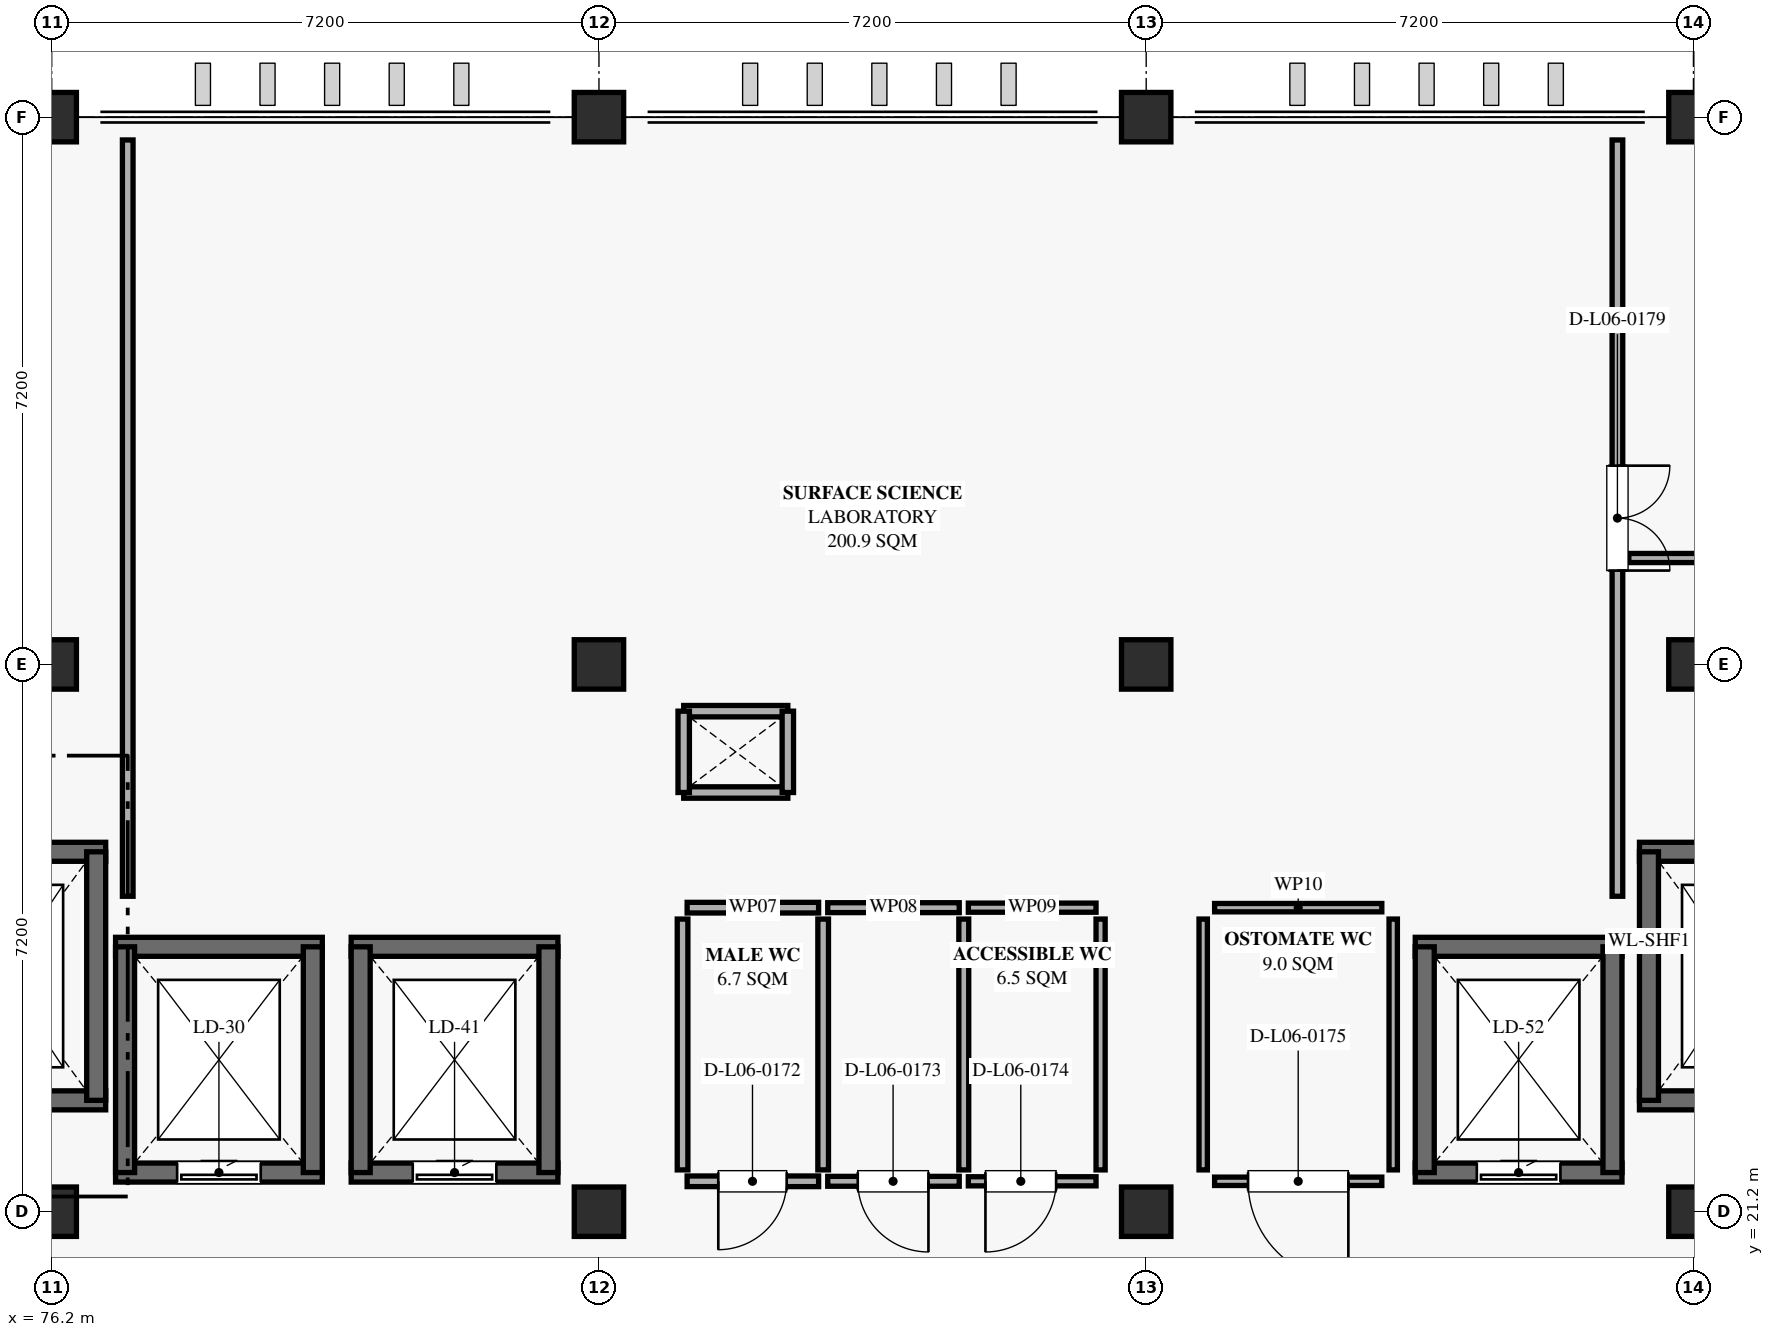
"""IFC4 building model, lengths in metres.
Left out: names, types, materials, properties, quantities, classifications, styles, units other than length and angle.
Written with IfcOpenShell. Run it as: python <this file> out.ifc"""

import sys

from ifc_helpers import new_model, si_unit, direction, frame, frame_2d, origin, origin_2d, place, context, subcontext, project, spatial, rectangle, extrude, element, fill, save


model = new_model("IFC4")
c1 = context("Model", 3, precision=1e-05, world=origin(), true_north=direction((0.0, 1.0)))
c2 = subcontext(c1, "Body", "Model", "MODEL_VIEW")
j1 = project(units=[si_unit("LENGTHUNIT", "METRE"), si_unit("PLANEANGLEUNIT", "RADIAN")], contexts=[c1])
p1 = place(None, origin())
s1 = spatial("IfcSite", under=j1, at=p1, CompositionType="ELEMENT")
p2 = place(p1, origin())
s2 = spatial("IfcBuilding", under=s1, at=p2, CompositionType="ELEMENT")
p3 = place(p2, frame((0.0, 0.0, 28.8)))
s3 = spatial("IfcBuildingStorey", under=s2, at=p3, CompositionType="ELEMENT", Elevation=28.8)
for number, where, z_axis, x_axis in (
    (1, (76.2, 21.2, 0.0), (0.0, 0.0, 1.0), (1.0, 0.0, 0.0)),
    (2, (83.4, 21.2, 0.0), (0.0, 0.0, 1.0), (1.0, 0.0, 0.0)),
    (3, (90.6, 21.2, 0.0), (0.0, 0.0, 1.0), (1.0, 0.0, 0.0)),
    (4, (97.8, 21.2, 0.0), (0.0, 0.0, 1.0), (1.0, 0.0, 0.0)),
    (5, (76.2, 28.4, 0.0), (0.0, 0.0, 1.0), (1.0, 0.0, 0.0)),
    (6, (83.4, 28.4, 0.0), (0.0, 0.0, 1.0), (1.0, 0.0, 0.0)),
    (7, (90.6, 28.4, 0.0), (0.0, 0.0, 1.0), (1.0, 0.0, 0.0)),
    (8, (97.8, 28.4, 0.0), (0.0, 0.0, 1.0), (1.0, 0.0, 0.0)),
    (9, (76.2, 35.6, 0.0), (0.0, 0.0, 1.0), (1.0, 0.0, 0.0)),
    (10, (83.4, 35.6, 0.0), (0.0, 0.0, 1.0), (1.0, 0.0, 0.0)),
    (11, (90.6, 35.6, 0.0), (0.0, 0.0, 1.0), (1.0, 0.0, 0.0)),
    (12, (97.8, 35.6, 0.0), (0.0, 0.0, 1.0), (1.0, 0.0, 0.0)),
):
    element("IfcColumn", number, at=place(p3, frame(where, z_axis=z_axis, x_axis=x_axis)), inside=s3, PredefinedType="COLUMN", context=c2, shape_type="SweptSolid", body=[
        extrude(rectangle(XDim=0.65, YDim=0.65, at=origin_2d()), origin(), (0.0, 0.0, 1.0), 4.5),
    ])
for number, where, z_axis, x_axis in (
    (13, (85.885, 26.715, 0.0), (0.0, 0.0, 1.0), (-1.0, 0.0, 0.0)),
    (14, (84.515, 27.785, 0.0), (0.0, 0.0, 1.0), (1.0, 0.0, 0.0)),
):
    element("IfcWall", number, at=place(p3, frame(where, z_axis=z_axis, x_axis=x_axis)), inside=s3, PredefinedType="PARTITIONING", context=c2, shape_type="SweptSolid", body=[
        extrude(rectangle(XDim=1.37, YDim=0.15, at=frame_2d((0.685, 0.0))), origin(), (0.0, 0.0, 1.0), 2.98),
    ])
for number, where, z_axis, x_axis in (
    (15, (84.515, 26.715, 0.0), (0.0, 0.0, 1.0), (0.0, 1.0, 0.0)),
    (16, (85.885, 27.785, 0.0), (0.0, 0.0, 1.0), (0.0, -1.0, 0.0)),
):
    element("IfcWall", number, at=place(p3, frame(where, z_axis=z_axis, x_axis=x_axis)), inside=s3, PredefinedType="PARTITIONING", context=c2, shape_type="SweptSolid", body=[
        extrude(rectangle(XDim=1.07, YDim=0.15, at=frame_2d((0.535, 0.0))), origin(), (0.0, 0.0, 1.0), 2.98),
    ])
for number, where, z_axis, x_axis in (
    (17, (76.91, 22.665, 0.0), (0.0, 0.0, 1.0), (-1.0, 0.0, 0.0)),
    (18, (74.19, 25.935, 0.0), (0.0, 0.0, 1.0), (1.0, 0.0, 0.0)),
):
    element("IfcWall", number, at=place(p3, frame(where, z_axis=z_axis, x_axis=x_axis)), inside=s3, PredefinedType="SHEAR", context=c2, shape_type="SweptSolid", body=[
        extrude(rectangle(XDim=2.72, YDim=0.25, at=frame_2d((1.36, 0.0))), origin(), (0.0, 0.0, 1.0), 4.23),
    ])
p4 = place(p3, frame((76.785, 25.935, 0.0), z_axis=(0.0, 0.0, 1.0), x_axis=(0.0, -1.0, 0.0)))
e19 = element("IfcWall", 19, at=p4, inside=s3, PredefinedType="SHEAR", context=c2, shape_type="SweptSolid", body=[
    extrude(rectangle(XDim=3.27, YDim=0.25, at=frame_2d((1.635, 0.0))), origin(), (0.0, 0.0, 1.0), 4.23),
])
for number, where, z_axis, x_axis in (
    (20, (99.81, 22.665, 0.0), (0.0, 0.0, 1.0), (-1.0, 0.0, 0.0)),
    (21, (97.09, 25.935, 0.0), (0.0, 0.0, 1.0), (1.0, 0.0, 0.0)),
):
    element("IfcWall", number, at=place(p3, frame(where, z_axis=z_axis, x_axis=x_axis)), inside=s3, PredefinedType="SHEAR", context=c2, shape_type="SweptSolid", body=[
        extrude(rectangle(XDim=2.72, YDim=0.25, at=frame_2d((1.36, 0.0))), origin(), (0.0, 0.0, 1.0), 4.23),
    ])
p5 = place(p3, frame((97.215, 22.665, 0.0), z_axis=(0.0, 0.0, 1.0), x_axis=(0.0, 1.0, 0.0)))
e22 = element("IfcWall", 22, at=p5, inside=s3, PredefinedType="SHEAR", context=c2, shape_type="SweptSolid", body=[
    extrude(rectangle(XDim=3.27, YDim=0.25, at=frame_2d((1.635, 0.0))), origin(), (0.0, 0.0, 1.0), 4.23),
])
p6 = place(p3, frame((79.76, 21.715, 0.0), z_axis=(0.0, 0.0, 1.0), x_axis=(-1.0, 0.0, 0.0)))
e23 = element("IfcWall", 23, at=p6, inside=s3, PredefinedType="SHEAR", context=c2, shape_type="SweptSolid", body=[
    extrude(rectangle(XDim=2.72, YDim=0.25, at=frame_2d((1.36, 0.0))), origin(), (0.0, 0.0, 1.0), 4.23),
])
p7 = place(p6, frame((0.81, 0.0, 0.0)))
e24 = element("IfcOpeningElement", 24, at=p7, cuts=e23, PredefinedType="OPENING", context=c2, shape_type="SweptSolid", body=[
    extrude(rectangle(XDim=1.1, YDim=2.2, at=frame_2d((0.55, 1.1))), frame((0.0, 0.135, 0.0), z_axis=(0.0, -1.0, 0.0), x_axis=(1.0, 0.0, 0.0)), (0.0, 0.0, 1.0), 0.27),
])
p8 = place(p3, frame((77.04, 24.685, 0.0), z_axis=(0.0, 0.0, 1.0), x_axis=(1.0, 0.0, 0.0)))
e25 = element("IfcWall", 25, at=p8, inside=s3, PredefinedType="SHEAR", context=c2, shape_type="SweptSolid", body=[
    extrude(rectangle(XDim=2.72, YDim=0.25, at=frame_2d((1.36, 0.0))), origin(), (0.0, 0.0, 1.0), 4.23),
])
for number, where, z_axis, x_axis in (
    (26, (77.165, 21.715, 0.0), (0.0, 0.0, 1.0), (0.0, 1.0, 0.0)),
    (27, (79.635, 24.685, 0.0), (0.0, 0.0, 1.0), (0.0, -1.0, 0.0)),
):
    element("IfcWall", number, at=place(p3, frame(where, z_axis=z_axis, x_axis=x_axis)), inside=s3, PredefinedType="SHEAR", context=c2, shape_type="SweptSolid", body=[
        extrude(rectangle(XDim=2.97, YDim=0.25, at=frame_2d((1.485, 0.0))), origin(), (0.0, 0.0, 1.0), 4.23),
    ])
p9 = place(p3, frame((82.86, 21.715, 0.0), z_axis=(0.0, 0.0, 1.0), x_axis=(-1.0, 0.0, 0.0)))
e28 = element("IfcWall", 28, at=p9, inside=s3, PredefinedType="SHEAR", context=c2, shape_type="SweptSolid", body=[
    extrude(rectangle(XDim=2.72, YDim=0.25, at=frame_2d((1.36, 0.0))), origin(), (0.0, 0.0, 1.0), 4.23),
])
p10 = place(p9, frame((0.81, 0.0, 0.0)))
e29 = element("IfcOpeningElement", 29, at=p10, cuts=e28, PredefinedType="OPENING", context=c2, shape_type="SweptSolid", body=[
    extrude(rectangle(XDim=1.1, YDim=2.2, at=frame_2d((0.55, 1.1))), frame((0.0, 0.135, 0.0), z_axis=(0.0, -1.0, 0.0), x_axis=(1.0, 0.0, 0.0)), (0.0, 0.0, 1.0), 0.27),
])
p11 = place(p3, frame((80.14, 24.685, 0.0), z_axis=(0.0, 0.0, 1.0), x_axis=(1.0, 0.0, 0.0)))
e30 = element("IfcWall", 30, at=p11, inside=s3, PredefinedType="SHEAR", context=c2, shape_type="SweptSolid", body=[
    extrude(rectangle(XDim=2.72, YDim=0.25, at=frame_2d((1.36, 0.0))), origin(), (0.0, 0.0, 1.0), 4.23),
])
for number, where, z_axis, x_axis in (
    (31, (80.265, 21.715, 0.0), (0.0, 0.0, 1.0), (0.0, 1.0, 0.0)),
    (32, (82.735, 24.685, 0.0), (0.0, 0.0, 1.0), (0.0, -1.0, 0.0)),
):
    element("IfcWall", number, at=place(p3, frame(where, z_axis=z_axis, x_axis=x_axis)), inside=s3, PredefinedType="SHEAR", context=c2, shape_type="SweptSolid", body=[
        extrude(rectangle(XDim=2.97, YDim=0.25, at=frame_2d((1.485, 0.0))), origin(), (0.0, 0.0, 1.0), 4.23),
    ])
p12 = place(p3, frame((96.86, 21.715, 0.0), z_axis=(0.0, 0.0, 1.0), x_axis=(-1.0, 0.0, 0.0)))
e33 = element("IfcWall", 33, at=p12, inside=s3, PredefinedType="SHEAR", context=c2, shape_type="SweptSolid", body=[
    extrude(rectangle(XDim=2.72, YDim=0.25, at=frame_2d((1.36, 0.0))), origin(), (0.0, 0.0, 1.0), 4.23),
])
p13 = place(p12, frame((0.81, 0.0, 0.0)))
e34 = element("IfcOpeningElement", 34, at=p13, cuts=e33, PredefinedType="OPENING", context=c2, shape_type="SweptSolid", body=[
    extrude(rectangle(XDim=1.1, YDim=2.2, at=frame_2d((0.55, 1.1))), frame((0.0, 0.135, 0.0), z_axis=(0.0, -1.0, 0.0), x_axis=(1.0, 0.0, 0.0)), (0.0, 0.0, 1.0), 0.27),
])
p14 = place(p3, frame((94.14, 24.685, 0.0), z_axis=(0.0, 0.0, 1.0), x_axis=(1.0, 0.0, 0.0)))
e35 = element("IfcWall", 35, at=p14, inside=s3, PredefinedType="SHEAR", context=c2, shape_type="SweptSolid", body=[
    extrude(rectangle(XDim=2.72, YDim=0.25, at=frame_2d((1.36, 0.0))), origin(), (0.0, 0.0, 1.0), 4.23),
])
for number, where, z_axis, x_axis in (
    (36, (94.265, 21.715, 0.0), (0.0, 0.0, 1.0), (0.0, 1.0, 0.0)),
    (37, (96.735, 24.685, 0.0), (0.0, 0.0, 1.0), (0.0, -1.0, 0.0)),
):
    element("IfcWall", number, at=place(p3, frame(where, z_axis=z_axis, x_axis=x_axis)), inside=s3, PredefinedType="SHEAR", context=c2, shape_type="SweptSolid", body=[
        extrude(rectangle(XDim=2.97, YDim=0.25, at=frame_2d((1.485, 0.0))), origin(), (0.0, 0.0, 1.0), 4.23),
    ])
p15 = place(p3, frame((86.29, 21.6, 0.0), z_axis=(0.0, 0.0, 1.0), x_axis=(-1.0, 0.0, 0.0)))
e38 = element("IfcWall", 38, at=p15, inside=s3, PredefinedType="PARTITIONING", context=c2, shape_type="SweptSolid", body=[
    extrude(rectangle(XDim=1.73, YDim=0.14, at=frame_2d((0.865, 0.0))), origin(), (0.0, 0.0, 1.0), 2.98),
])
p16 = place(p15, frame((0.42, 0.0, 0.0)))
e39 = element("IfcOpeningElement", 39, at=p16, cuts=e38, PredefinedType="OPENING", context=c2, shape_type="SweptSolid", body=[
    extrude(rectangle(XDim=0.9, YDim=2.22, at=frame_2d((0.45, 1.11))), frame((0.0, 0.08, 0.0), z_axis=(0.0, -1.0, 0.0), x_axis=(1.0, 0.0, 0.0)), (0.0, 0.0, 1.0), 0.16),
])
p17 = place(p3, frame((84.56, 25.2, 0.0), z_axis=(0.0, 0.0, 1.0), x_axis=(1.0, 0.0, 0.0)))
e40 = element("IfcWall", 40, at=p17, inside=s3, PredefinedType="PARTITIONING", context=c2, shape_type="SweptSolid", body=[
    extrude(rectangle(XDim=1.73, YDim=0.14, at=frame_2d((0.865, 0.0))), origin(), (0.0, 0.0, 1.0), 2.98),
])
for number, where, z_axis, x_axis in (
    (41, (84.5, 21.75, 0.0), (0.0, 0.0, 1.0), (0.0, 1.0, 0.0)),
    (42, (86.35, 25.05, 0.0), (0.0, 0.0, 1.0), (0.0, -1.0, 0.0)),
):
    element("IfcWall", number, at=place(p3, frame(where, z_axis=z_axis, x_axis=x_axis)), inside=s3, PredefinedType="PARTITIONING", context=c2, shape_type="SweptSolid", body=[
        extrude(rectangle(XDim=3.3, YDim=0.14, at=frame_2d((1.65, 0.0))), origin(), (0.0, 0.0, 1.0), 2.98),
    ])
p18 = place(p3, frame((88.14, 21.6, 0.0), z_axis=(0.0, 0.0, 1.0), x_axis=(-1.0, 0.0, 0.0)))
e43 = element("IfcWall", 43, at=p18, inside=s3, PredefinedType="PARTITIONING", context=c2, shape_type="SweptSolid", body=[
    extrude(rectangle(XDim=1.73, YDim=0.13, at=frame_2d((0.865, 0.0))), origin(), (0.0, 0.0, 1.0), 2.98),
])
p19 = place(p18, frame((0.405, 0.0, 0.0)))
e44 = element("IfcOpeningElement", 44, at=p19, cuts=e43, PredefinedType="OPENING", context=c2, shape_type="SweptSolid", body=[
    extrude(rectangle(XDim=0.93, YDim=2.05, at=frame_2d((0.465, 1.025))), frame((0.0, 0.075, 0.0), z_axis=(0.0, -1.0, 0.0), x_axis=(1.0, 0.0, 0.0)), (0.0, 0.0, 1.0), 0.15),
])
p20 = place(p3, frame((86.41, 25.2, 0.0), z_axis=(0.0, 0.0, 1.0), x_axis=(1.0, 0.0, 0.0)))
e45 = element("IfcWall", 45, at=p20, inside=s3, PredefinedType="PARTITIONING", context=c2, shape_type="SweptSolid", body=[
    extrude(rectangle(XDim=1.73, YDim=0.13, at=frame_2d((0.865, 0.0))), origin(), (0.0, 0.0, 1.0), 2.98),
])
p21 = place(p3, frame((88.2, 25.05, 0.0), z_axis=(0.0, 0.0, 1.0), x_axis=(0.0, -1.0, 0.0)))
e46 = element("IfcWall", 46, at=p21, inside=s3, PredefinedType="PARTITIONING", context=c2, shape_type="SweptSolid", body=[
    extrude(rectangle(XDim=3.3, YDim=0.13, at=frame_2d((1.65, 0.0))), origin(), (0.0, 0.0, 1.0), 2.98),
])
p22 = place(p3, frame((89.94, 21.6, 0.0), z_axis=(0.0, 0.0, 1.0), x_axis=(-1.0, 0.0, 0.0)))
e47 = element("IfcWall", 47, at=p22, inside=s3, PredefinedType="PARTITIONING", context=c2, shape_type="SweptSolid", body=[
    extrude(rectangle(XDim=1.68, YDim=0.12, at=frame_2d((0.84, 0.0))), origin(), (0.0, 0.0, 1.0), 2.98),
])
p23 = place(p22, frame((0.525, 0.0, 0.0)))
e48 = element("IfcOpeningElement", 48, at=p23, cuts=e47, PredefinedType="OPENING", context=c2, shape_type="SweptSolid", body=[
    extrude(rectangle(XDim=0.93, YDim=2.1, at=frame_2d((0.465, 1.05))), frame((0.0, 0.07, 0.0), z_axis=(0.0, -1.0, 0.0), x_axis=(1.0, 0.0, 0.0)), (0.0, 0.0, 1.0), 0.14),
])
p24 = place(p3, frame((88.26, 25.2, 0.0), z_axis=(0.0, 0.0, 1.0), x_axis=(1.0, 0.0, 0.0)))
e49 = element("IfcWall", 49, at=p24, inside=s3, PredefinedType="PARTITIONING", context=c2, shape_type="SweptSolid", body=[
    extrude(rectangle(XDim=1.68, YDim=0.12, at=frame_2d((0.84, 0.0))), origin(), (0.0, 0.0, 1.0), 2.98),
])
p25 = place(p3, frame((90.0, 25.05, 0.0), z_axis=(0.0, 0.0, 1.0), x_axis=(0.0, -1.0, 0.0)))
e50 = element("IfcWall", 50, at=p25, inside=s3, PredefinedType="PARTITIONING", context=c2, shape_type="SweptSolid", body=[
    extrude(rectangle(XDim=3.3, YDim=0.12, at=frame_2d((1.65, 0.0))), origin(), (0.0, 0.0, 1.0), 2.98),
])
p26 = place(p3, frame((93.7, 21.6, 0.0), z_axis=(0.0, 0.0, 1.0), x_axis=(-1.0, 0.0, 0.0)))
e51 = element("IfcWall", 51, at=p26, inside=s3, PredefinedType="PARTITIONING", context=c2, shape_type="SweptSolid", body=[
    extrude(rectangle(XDim=2.2, YDim=0.11, at=frame_2d((1.1, 0.0))), origin(), (0.0, 0.0, 1.0), 2.98),
])
p27 = place(p26, frame((0.44, 0.0, 0.0)))
e52 = element("IfcOpeningElement", 52, at=p27, cuts=e51, PredefinedType="OPENING", context=c2, shape_type="SweptSolid", body=[
    extrude(rectangle(XDim=1.32, YDim=2.16, at=frame_2d((0.66, 1.08))), frame((0.0, 0.065, 0.0), z_axis=(0.0, -1.0, 0.0), x_axis=(1.0, 0.0, 0.0)), (0.0, 0.0, 1.0), 0.13),
])
p28 = place(p3, frame((91.5, 25.2, 0.0), z_axis=(0.0, 0.0, 1.0), x_axis=(1.0, 0.0, 0.0)))
e53 = element("IfcWall", 53, at=p28, inside=s3, PredefinedType="PARTITIONING", context=c2, shape_type="SweptSolid", body=[
    extrude(rectangle(XDim=2.2, YDim=0.11, at=frame_2d((1.1, 0.0))), origin(), (0.0, 0.0, 1.0), 2.98),
])
for number, where, z_axis, x_axis in (
    (54, (91.35, 21.75, 0.0), (0.0, 0.0, 1.0), (0.0, 1.0, 0.0)),
    (55, (93.85, 25.05, 0.0), (0.0, 0.0, 1.0), (0.0, -1.0, 0.0)),
):
    element("IfcWall", number, at=place(p3, frame(where, z_axis=z_axis, x_axis=x_axis)), inside=s3, PredefinedType="PARTITIONING", context=c2, shape_type="SweptSolid", body=[
        extrude(rectangle(XDim=3.3, YDim=0.11, at=frame_2d((1.65, 0.0))), origin(), (0.0, 0.0, 1.0), 2.98),
    ])
p29 = place(p3, frame((77.2, 25.35, 0.0), z_axis=(0.0, 0.0, 1.0), x_axis=(0.0, 1.0, 0.0)))
e56 = element("IfcWall", 56, at=p29, inside=s3, PredefinedType="PARTITIONING", context=c2, shape_type="SweptSolid", body=[
    extrude(rectangle(XDim=9.95, YDim=0.14, at=frame_2d((4.975, 0.0))), origin(), (0.0, 0.0, 1.0), 2.98),
])
p30 = place(p3, frame((96.8, 35.3, 0.0), z_axis=(0.0, 0.0, 1.0), x_axis=(0.0, -1.0, 0.0)))
e57 = element("IfcWall", 57, at=p30, inside=s3, PredefinedType="PARTITIONING", context=c2, shape_type="SweptSolid", body=[
    extrude(rectangle(XDim=9.95, YDim=0.14, at=frame_2d((4.975, 0.0))), origin(), (0.0, 0.0, 1.0), 2.98),
])
p31 = place(p30, frame((4.285, 0.0, 0.0)))
e58 = element("IfcOpeningElement", 58, at=p31, cuts=e57, PredefinedType="OPENING", context=c2, shape_type="SweptSolid", body=[
    extrude(rectangle(XDim=1.38, YDim=2.16, at=frame_2d((0.69, 1.08))), frame((0.0, 0.08, 0.0), z_axis=(0.0, -1.0, 0.0), x_axis=(1.0, 0.0, 0.0)), (0.0, 0.0, 1.0), 0.16),
])
p32 = place(p3, frame((111.03, 29.8, 0.0), z_axis=(0.0, 0.0, 1.0), x_axis=(-1.0, 0.0, 0.0)))
e59 = element("IfcWall", 59, at=p32, inside=s3, PredefinedType="PARTITIONING", context=c2, shape_type="SweptSolid", body=[
    extrude(rectangle(XDim=14.08, YDim=0.12, at=frame_2d((7.04, 0.0))), origin(), (0.0, 0.0, 1.0), 2.98),
])
p33 = place(p32, frame((8.94, 0.0, 0.0)))
e60 = element("IfcOpeningElement", 60, at=p33, cuts=e59, PredefinedType="OPENING", context=c2, shape_type="SweptSolid", body=[
    extrude(rectangle(XDim=1.38, YDim=2.22, at=frame_2d((0.69, 1.11))), frame((0.0, 0.07, 0.0), z_axis=(0.0, -1.0, 0.0), x_axis=(1.0, 0.0, 0.0)), (0.0, 0.0, 1.0), 0.14),
])
p34 = place(p7, origin())
e61 = element("IfcDoor", 61, at=p34, inside=s3, OperationType="SLIDING_TO_LEFT", PredefinedType="DOOR", context=c2, shape_type="SweptSolid", body=[
    extrude(rectangle(XDim=1.1, YDim=2.2, at=frame_2d((0.55, 1.1))), frame((0.0, 0.025, 0.0), z_axis=(0.0, -1.0, 0.0), x_axis=(1.0, 0.0, 0.0)), (0.0, 0.0, 1.0), 0.05),
])
fill(e24, e61)
p35 = place(p10, origin())
e62 = element("IfcDoor", 62, at=p35, inside=s3, OperationType="SLIDING_TO_LEFT", PredefinedType="DOOR", context=c2, shape_type="SweptSolid", body=[
    extrude(rectangle(XDim=1.1, YDim=2.2, at=frame_2d((0.55, 1.1))), frame((0.0, 0.025, 0.0), z_axis=(0.0, -1.0, 0.0), x_axis=(1.0, 0.0, 0.0)), (0.0, 0.0, 1.0), 0.05),
])
fill(e29, e62)
p36 = place(p13, origin())
e63 = element("IfcDoor", 63, at=p36, inside=s3, OperationType="SLIDING_TO_LEFT", PredefinedType="DOOR", context=c2, shape_type="SweptSolid", body=[
    extrude(rectangle(XDim=1.1, YDim=2.2, at=frame_2d((0.55, 1.1))), frame((0.0, 0.025, 0.0), z_axis=(0.0, -1.0, 0.0), x_axis=(1.0, 0.0, 0.0)), (0.0, 0.0, 1.0), 0.05),
])
fill(e34, e63)
p37 = place(p16, origin())
e64 = element("IfcDoor", 64, at=p37, inside=s3, OperationType="SINGLE_SWING_RIGHT", PredefinedType="DOOR", context=c2, shape_type="SweptSolid", body=[
    extrude(rectangle(XDim=0.9, YDim=2.22, at=frame_2d((0.45, 1.11))), frame((0.0, 0.025, 0.0), z_axis=(0.0, -1.0, 0.0), x_axis=(1.0, 0.0, 0.0)), (0.0, 0.0, 1.0), 0.05),
])
fill(e39, e64)
p38 = place(p19, origin())
e65 = element("IfcDoor", 65, at=p38, inside=s3, OperationType="SINGLE_SWING_LEFT", PredefinedType="DOOR", context=c2, shape_type="SweptSolid", body=[
    extrude(rectangle(XDim=0.93, YDim=2.05, at=frame_2d((0.465, 1.025))), frame((0.0, 0.025, 0.0), z_axis=(0.0, -1.0, 0.0), x_axis=(1.0, 0.0, 0.0)), (0.0, 0.0, 1.0), 0.05),
])
fill(e44, e65)
p39 = place(p23, origin())
e66 = element("IfcDoor", 66, at=p39, inside=s3, OperationType="SINGLE_SWING_RIGHT", PredefinedType="DOOR", context=c2, shape_type="SweptSolid", body=[
    extrude(rectangle(XDim=0.93, YDim=2.1, at=frame_2d((0.465, 1.05))), frame((0.0, 0.025, 0.0), z_axis=(0.0, -1.0, 0.0), x_axis=(1.0, 0.0, 0.0)), (0.0, 0.0, 1.0), 0.05),
])
fill(e48, e66)
p40 = place(p27, origin())
e67 = element("IfcDoor", 67, at=p40, inside=s3, OperationType="SINGLE_SWING_LEFT", PredefinedType="DOOR", context=c2, shape_type="SweptSolid", body=[
    extrude(rectangle(XDim=1.32, YDim=2.16, at=frame_2d((0.66, 1.08))), frame((0.0, 0.025, 0.0), z_axis=(0.0, -1.0, 0.0), x_axis=(1.0, 0.0, 0.0)), (0.0, 0.0, 1.0), 0.05),
])
fill(e52, e67)
p41 = place(p31, origin())
e68 = element("IfcDoor", 68, at=p41, inside=s3, OperationType="DOUBLE_DOOR_SINGLE_SWING", PredefinedType="DOOR", context=c2, shape_type="SweptSolid", body=[
    extrude(rectangle(XDim=1.38, YDim=2.16, at=frame_2d((0.69, 1.08))), frame((0.0, 0.025, 0.0), z_axis=(0.0, -1.0, 0.0), x_axis=(1.0, 0.0, 0.0)), (0.0, 0.0, 1.0), 0.05),
])
fill(e58, e68)
save(model, sys.argv[1])
